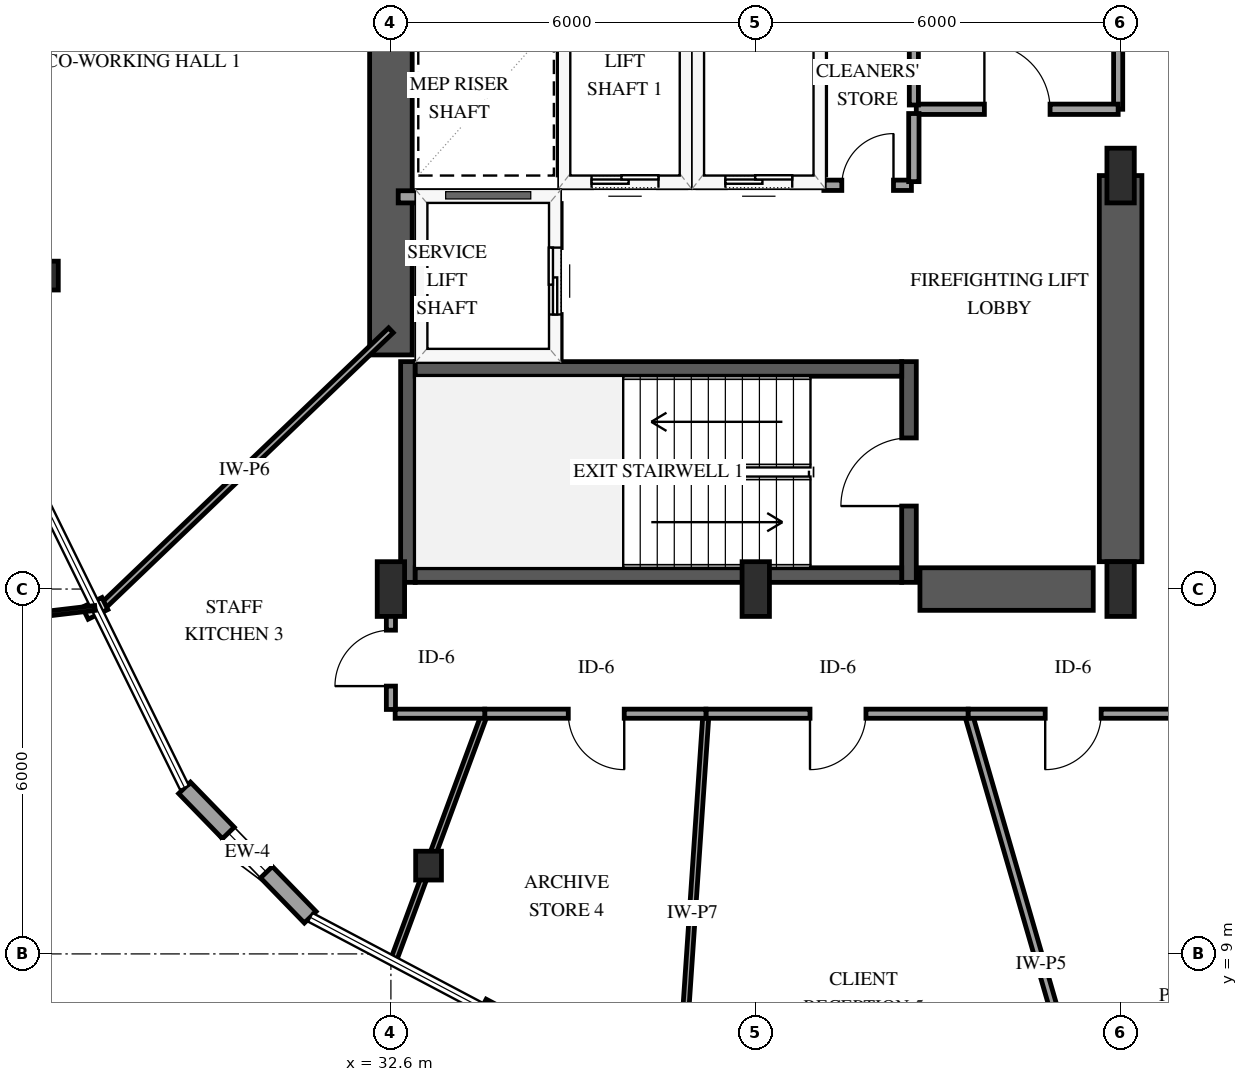
"""IFC4 building model, lengths in metres.
Left out: names, types, materials, properties, quantities, classifications, styles, units other than length and angle.
Written with IfcOpenShell. Run it as: python <this file> out.ifc"""

import sys

from ifc_helpers import new_model, si_unit, direction, frame, frame_2d, origin, origin_2d, place, context, subcontext, project, spatial, rectangle, i_section, extrude, element, fill, save


model = new_model("IFC4")
c1 = context("Model", 3, precision=1e-05, world=origin(), true_north=direction((0.0, 1.0)))
c2 = subcontext(c1, "Body", "Model", "MODEL_VIEW")
j1 = project(units=[si_unit("LENGTHUNIT", "METRE"), si_unit("PLANEANGLEUNIT", "RADIAN")], contexts=[c1])
p1 = place(None, origin())
s1 = spatial("IfcSite", under=j1, at=p1, CompositionType="ELEMENT")
p2 = place(p1, origin())
s2 = spatial("IfcBuilding", under=s1, at=p2, CompositionType="ELEMENT")
p3 = place(p2, frame((0.0, 0.0, 58.6)))
s3 = spatial("IfcBuildingStorey", under=s2, at=p3, CompositionType="ELEMENT", Elevation=58.6)
p4 = place(p3, frame((32.88, 15.11, 0.0), z_axis=(0.0, 0.0, 1.0), x_axis=(0.0, 1.0, 0.0)))
e1 = element("IfcWall", 1, at=p4, inside=s3, PredefinedType="SHEAR", context=c2, shape_type="SweptSolid", body=[
    extrude(rectangle(XDim=3.63, YDim=0.24, at=frame_2d((1.815, 0.0))), origin(), (0.0, 0.0, 1.0), 4.0),
])
p5 = place(p3, frame((41.12, 15.11, 0.0), z_axis=(0.0, 0.0, 1.0), x_axis=(0.0, 1.0, 0.0)))
e2 = element("IfcWall", 2, at=p5, inside=s3, PredefinedType="SHEAR", context=c2, shape_type="SweptSolid", body=[
    extrude(rectangle(XDim=3.63, YDim=0.24, at=frame_2d((1.815, 0.0))), origin(), (0.0, 0.0, 1.0), 4.0),
])
p6 = place(p5, frame((1.255, 0.0, 0.0)))
e3 = element("IfcOpeningElement", 3, at=p6, cuts=e2, PredefinedType="OPENING", context=c2, shape_type="SweptSolid", body=[
    extrude(rectangle(XDim=1.12, YDim=2.15, at=frame_2d((0.56, 1.075))), frame((0.0, 0.13, 0.0), z_axis=(0.0, -1.0, 0.0), x_axis=(1.0, 0.0, 0.0)), (0.0, 0.0, 1.0), 0.26),
])
for number, where, z_axis, x_axis in (
    (4, (33.0, 15.23, 0.0), (0.0, 0.0, 1.0), (1.0, 0.0, 0.0)),
    (5, (33.0, 18.62, 0.0), (0.0, 0.0, 1.0), (1.0, 0.0, 0.0)),
):
    element("IfcWall", number, at=place(p3, frame(where, z_axis=z_axis, x_axis=x_axis)), inside=s3, PredefinedType="SHEAR", context=c2, shape_type="SweptSolid", body=[
        extrude(rectangle(XDim=8.0, YDim=0.24, at=frame_2d((4.0, 0.0))), origin(), (0.0, 0.0, 1.0), 4.0),
    ])
p7 = place(p3, frame((32.6, 18.85, 0.0), z_axis=(0.0, 0.0, 1.0), x_axis=(0.0, 1.0, 0.0)))
e6 = element("IfcWall", 6, at=p7, inside=s3, PredefinedType="SHEAR", context=c2, shape_type="SweptSolid", body=[
    extrude(rectangle(XDim=12.3, YDim=0.7, at=frame_2d((6.15, 0.0))), origin(), (0.0, 0.0, 1.0), 4.0),
])
p8 = place(p3, frame((41.3, 15.0, 0.0), z_axis=(0.0, 0.0, 1.0), x_axis=(1.0, 0.0, 0.0)))
e7 = element("IfcWall", 7, at=p8, inside=s3, PredefinedType="SHEAR", context=c2, shape_type="SweptSolid", body=[
    extrude(rectangle(XDim=2.85, YDim=0.7, at=frame_2d((1.425, 0.0))), origin(), (0.0, 0.0, 1.0), 4.0),
])
p9 = place(p3, frame((44.6, 15.45, 0.0), z_axis=(0.0, 0.0, 1.0), x_axis=(0.0, 1.0, 0.0)))
e8 = element("IfcWall", 8, at=p9, inside=s3, PredefinedType="SHEAR", context=c2, shape_type="SweptSolid", body=[
    extrude(rectangle(XDim=6.35, YDim=0.7, at=frame_2d((3.175, 0.0))), origin(), (0.0, 0.0, 1.0), 4.0),
])
for number, where, z_axis, x_axis in (
    (9, (32.6, 15.0, 0.0), (0.0, 0.0, 1.0), (1.0, 0.0, 0.0)),
    (10, (38.6, 15.0, 0.0), (0.0, 0.0, 1.0), (1.0, 0.0, 0.0)),
    (11, (44.6, 15.0, 0.0), (0.0, 0.0, 1.0), (1.0, 0.0, 0.0)),
    (12, (44.6, 21.8, 0.0), (0.0, 0.0, 1.0), (1.0, 0.0, 0.0)),
):
    element("IfcColumn", number, at=place(p3, frame(where, z_axis=z_axis, x_axis=x_axis)), inside=s3, PredefinedType="PILASTER", context=c2, shape_type="SweptSolid", body=[
        extrude(rectangle(XDim=0.45, YDim=0.9, at=origin_2d()), origin(), (0.0, 0.0, 1.0), 4.0),
    ])
for number, where, z_axis, x_axis in (
    (13, (26.918, 20.155, 0.0), (0.0, 0.0, 1.0), (1.0, 0.0, 0.0)),
    (14, (33.219, 10.452, 0.0), (0.0, 0.0, 1.0), (1.0, 0.0, 0.0)),
):
    element("IfcColumn", number, at=place(p3, frame(where, z_axis=z_axis, x_axis=x_axis)), inside=s3, PredefinedType="COLUMN", context=c2, shape_type="SweptSolid", body=[
        extrude(i_section(OverallWidth=0.424, OverallDepth=0.474, WebThickness=0.048, FlangeThickness=0.077, FilletRadius=0.038, at=origin_2d()), origin(), (0.0, 0.0, 1.0), 4.0),
    ])
p10 = place(p3, frame((29.207, 11.731, 0.0), z_axis=(0.0, 0.0, 1.0), x_axis=(0.69666106732, -0.717400416282, 0.0)))
e15 = element("IfcWall", 15, at=p10, inside=s3, PredefinedType="SOLIDWALL", context=c2, shape_type="SweptSolid", body=[
    extrude(rectangle(XDim=2.967, YDim=0.27, at=frame_2d((1.483, 0.0))), origin(), (0.0, 0.0, 1.0), 3.079),
])
p11 = place(p10, frame((1.033, 0.0, 0.75)))
e16 = element("IfcOpeningElement", 16, at=p11, cuts=e15, PredefinedType="OPENING", context=c2, shape_type="SweptSolid", body=[
    extrude(rectangle(XDim=0.9, YDim=1.5, at=frame_2d((0.45, 0.75))), frame((0.0, 0.145, 0.0), z_axis=(0.0, -1.0, 0.0), x_axis=(1.0, 0.0, 0.0)), (0.0, 0.0, 1.0), 0.29),
])
p12 = place(p3, frame((35.45, 21.7, 0.0), z_axis=(0.0, 0.0, 1.0), x_axis=(1.0, 0.0, 0.0)))
e17 = element("IfcWall", 17, at=p12, inside=s3, PredefinedType="SOLIDWALL", context=c2, shape_type="SweptSolid", body=[
    extrude(rectangle(XDim=2.0, YDim=0.2, at=frame_2d((1.0, 0.0))), origin(), (0.0, 0.0, 1.0), 3.7),
])
p13 = place(p12, frame((0.45, 0.0, 0.0)))
e18 = element("IfcOpeningElement", 18, at=p13, cuts=e17, PredefinedType="OPENING", context=c2, shape_type="SweptSolid", body=[
    extrude(rectangle(XDim=1.1, YDim=2.15, at=frame_2d((0.55, 1.075))), frame((0.0, 0.11, 0.0), z_axis=(0.0, -1.0, 0.0), x_axis=(1.0, 0.0, 0.0)), (0.0, 0.0, 1.0), 0.22),
])
for number, where, z_axis, x_axis in (
    (19, (35.45, 21.81, 0.0), (0.0, 0.0, 1.0), (0.0, 1.0, 0.0)),
    (20, (37.45, 21.81, 0.0), (0.0, 0.0, 1.0), (0.0, 1.0, 0.0)),
):
    element("IfcWall", number, at=place(p3, frame(where, z_axis=z_axis, x_axis=x_axis)), inside=s3, PredefinedType="SOLIDWALL", context=c2, shape_type="SweptSolid", body=[
        extrude(rectangle(XDim=2.38, YDim=0.2, at=frame_2d((1.19, 0.0))), origin(), (0.0, 0.0, 1.0), 3.7),
    ])
p14 = place(p3, frame((37.65, 21.7, 0.0), z_axis=(0.0, 0.0, 1.0), x_axis=(1.0, 0.0, 0.0)))
e21 = element("IfcWall", 21, at=p14, inside=s3, PredefinedType="SOLIDWALL", context=c2, shape_type="SweptSolid", body=[
    extrude(rectangle(XDim=2.0, YDim=0.2, at=frame_2d((1.0, 0.0))), origin(), (0.0, 0.0, 1.0), 3.7),
])
p15 = place(p14, frame((0.45, 0.0, 0.0)))
e22 = element("IfcOpeningElement", 22, at=p15, cuts=e21, PredefinedType="OPENING", context=c2, shape_type="SweptSolid", body=[
    extrude(rectangle(XDim=1.1, YDim=2.15, at=frame_2d((0.55, 1.075))), frame((0.0, 0.11, 0.0), z_axis=(0.0, -1.0, 0.0), x_axis=(1.0, 0.0, 0.0)), (0.0, 0.0, 1.0), 0.22),
])
p16 = place(p3, frame((39.65, 21.81, 0.0), z_axis=(0.0, 0.0, 1.0), x_axis=(0.0, 1.0, 0.0)))
e23 = element("IfcWall", 23, at=p16, inside=s3, PredefinedType="SOLIDWALL", context=c2, shape_type="SweptSolid", body=[
    extrude(rectangle(XDim=2.38, YDim=0.2, at=frame_2d((1.19, 0.0))), origin(), (0.0, 0.0, 1.0), 3.7),
])
p17 = place(p3, frame((32.72, 21.45, 0.0), z_axis=(0.0, 0.0, 1.0), x_axis=(1.0, 0.0, 0.0)))
e24 = element("IfcWall", 24, at=p17, inside=s3, PredefinedType="SOLIDWALL", context=c2, shape_type="SweptSolid", body=[
    extrude(rectangle(XDim=2.58, YDim=0.2, at=frame_2d((1.29, 0.0))), origin(), (0.0, 0.0, 1.0), 3.7),
])
p18 = place(p3, frame((35.3, 18.79, 0.0), z_axis=(0.0, 0.0, 1.0), x_axis=(0.0, 1.0, 0.0)))
e25 = element("IfcWall", 25, at=p18, inside=s3, PredefinedType="SOLIDWALL", context=c2, shape_type="SweptSolid", body=[
    extrude(rectangle(XDim=2.55, YDim=0.2, at=frame_2d((1.275, 0.0))), origin(), (0.0, 0.0, 1.0), 3.7),
])
p19 = place(p18, frame((0.725, 0.0, 0.0)))
e26 = element("IfcOpeningElement", 26, at=p19, cuts=e25, PredefinedType="OPENING", context=c2, shape_type="SweptSolid", body=[
    extrude(rectangle(XDim=1.1, YDim=2.15, at=frame_2d((0.55, 1.075))), frame((0.0, 0.11, 0.0), z_axis=(0.0, -1.0, 0.0), x_axis=(1.0, 0.0, 0.0)), (0.0, 0.0, 1.0), 0.22),
])
p20 = place(p3, frame((42.094, 12.95, 0.0), z_axis=(0.0, 0.0, 1.0), x_axis=(0.278463654044, -0.960446767591, 0.0)))
e27 = element("IfcWall", 27, at=p20, inside=s3, PredefinedType="PARTITIONING", context=c2, shape_type="SweptSolid", body=[
    extrude(rectangle(XDim=8.594, YDim=0.13, at=frame_2d((4.297, 0.0))), origin(), (0.0, 0.0, 1.0), 2.995),
])
p21 = place(p3, frame((44.56, 29.8, 0.0), z_axis=(0.0, 0.0, 1.0), x_axis=(0.0, -1.0, 0.0)))
e28 = element("IfcWall", 28, at=p21, inside=s3, PredefinedType="PARTITIONING", context=c2, shape_type="SweptSolid", body=[
    extrude(rectangle(XDim=6.91, YDim=0.15, at=frame_2d((3.455, 0.0))), origin(), (0.0, 0.0, 1.0), 2.74),
])
p22 = place(p21, frame((2.915, 0.0, 0.0)))
e29 = element("IfcOpeningElement", 29, at=p22, cuts=e28, PredefinedType="OPENING", context=c2, shape_type="SweptSolid", body=[
    extrude(rectangle(XDim=1.08, YDim=2.15, at=frame_2d((0.54, 1.075))), frame((0.0, 0.085, 0.0), z_axis=(0.0, -1.0, 0.0), x_axis=(1.0, 0.0, 0.0)), (0.0, 0.0, 1.0), 0.17),
])
p23 = place(p3, frame((32.6, 19.255, 0.0), z_axis=(0.0, 0.0, 1.0), x_axis=(-0.722302567559, -0.691577183615, 0.0)))
e30 = element("IfcWall", 30, at=p23, inside=s3, PredefinedType="PARTITIONING", context=c2, shape_type="SweptSolid", body=[
    extrude(rectangle(XDim=6.675, YDim=0.11, at=frame_2d((3.337, 0.0))), origin(), (0.0, 0.0, 1.0), 3.7),
])
p24 = place(p3, frame((37.781, 12.95, 0.0), z_axis=(0.0, 0.0, 1.0), x_axis=(-0.067802603225, -0.997698755635, 0.0)))
e31 = element("IfcWall", 31, at=p24, inside=s3, PredefinedType="PARTITIONING", context=c2, shape_type="SweptSolid", body=[
    extrude(rectangle(XDim=6.564, YDim=0.1, at=frame_2d((3.282, 0.0))), origin(), (0.0, 0.0, 1.0), 3.7),
])
p25 = place(p3, frame((34.143, 12.95, 0.0), z_axis=(0.0, 0.0, 1.0), x_axis=(-0.347011852363, -0.937860743565, 0.0)))
e32 = element("IfcWall", 32, at=p25, inside=s3, PredefinedType="PARTITIONING", context=c2, shape_type="SweptSolid", body=[
    extrude(rectangle(XDim=4.337, YDim=0.1, at=frame_2d((2.169, 0.0))), origin(), (0.0, 0.0, 1.0), 2.995),
])
p26 = place(p3, frame((42.094, 12.95, 0.0), z_axis=(0.0, 0.0, 1.0), x_axis=(-1.0, 0.0, 0.0)))
e33 = element("IfcWall", 33, at=p26, inside=s3, PredefinedType="PARTITIONING", context=c2, shape_type="SweptSolid", body=[
    extrude(rectangle(XDim=4.313, YDim=0.15, at=frame_2d((2.156, 0.0))), origin(), (0.0, 0.0, 1.0), 3.7),
])
p27 = place(p26, frame((1.682, 0.0, 0.0)))
e34 = element("IfcOpeningElement", 34, at=p27, cuts=e33, PredefinedType="OPENING", context=c2, shape_type="SweptSolid", body=[
    extrude(rectangle(XDim=0.92, YDim=2.12, at=frame_2d((0.46, 1.06))), frame((0.0, 0.085, 0.0), z_axis=(0.0, -1.0, 0.0), x_axis=(1.0, 0.0, 0.0)), (0.0, 0.0, 1.0), 0.17),
])
p28 = place(p3, frame((37.781, 12.95, 0.0), z_axis=(0.0, 0.0, 1.0), x_axis=(-1.0, 0.0, 0.0)))
e35 = element("IfcWall", 35, at=p28, inside=s3, PredefinedType="PARTITIONING", context=c2, shape_type="SweptSolid", body=[
    extrude(rectangle(XDim=3.638, YDim=0.15, at=frame_2d((1.819, 0.0))), origin(), (0.0, 0.0, 1.0), 3.7),
])
p29 = place(p28, frame((1.344, 0.0, 0.0)))
e36 = element("IfcOpeningElement", 36, at=p29, cuts=e35, PredefinedType="OPENING", context=c2, shape_type="SweptSolid", body=[
    extrude(rectangle(XDim=0.92, YDim=2.12, at=frame_2d((0.46, 1.06))), frame((0.0, 0.085, 0.0), z_axis=(0.0, -1.0, 0.0), x_axis=(1.0, 0.0, 0.0)), (0.0, 0.0, 1.0), 0.17),
])
p30 = place(p3, frame((45.517, 12.95, 0.0), z_axis=(0.0, 0.0, 1.0), x_axis=(-1.0, 0.0, 0.0)))
e37 = element("IfcWall", 37, at=p30, inside=s3, PredefinedType="PARTITIONING", context=c2, shape_type="SweptSolid", body=[
    extrude(rectangle(XDim=3.423, YDim=0.15, at=frame_2d((1.711, 0.0))), origin(), (0.0, 0.0, 1.0), 3.7),
])
p31 = place(p30, frame((1.237, 0.0, 0.0)))
e38 = element("IfcOpeningElement", 38, at=p31, cuts=e37, PredefinedType="OPENING", context=c2, shape_type="SweptSolid", body=[
    extrude(rectangle(XDim=0.92, YDim=2.12, at=frame_2d((0.46, 1.06))), frame((0.0, 0.085, 0.0), z_axis=(0.0, -1.0, 0.0), x_axis=(1.0, 0.0, 0.0)), (0.0, 0.0, 1.0), 0.17),
])
p32 = place(p3, frame((41.24, 22.89, 0.0), z_axis=(0.0, 0.0, 1.0), x_axis=(1.0, 0.0, 0.0)))
e39 = element("IfcWall", 39, at=p32, inside=s3, PredefinedType="PARTITIONING", context=c2, shape_type="SweptSolid", body=[
    extrude(rectangle(XDim=3.32, YDim=0.17, at=frame_2d((1.66, 0.0))), origin(), (0.0, 0.0, 1.0), 3.7),
])
p33 = place(p32, frame((1.12, 0.0, 0.0)))
e40 = element("IfcOpeningElement", 40, at=p33, cuts=e39, PredefinedType="OPENING", context=c2, shape_type="SweptSolid", body=[
    extrude(rectangle(XDim=1.08, YDim=2.15, at=frame_2d((0.54, 1.075))), frame((0.0, 0.095, 0.0), z_axis=(0.0, -1.0, 0.0), x_axis=(1.0, 0.0, 0.0)), (0.0, 0.0, 1.0), 0.19),
])
p34 = place(p3, frame((32.6, 13.02, 0.0), z_axis=(0.0, 0.0, 1.0), x_axis=(0.0, 1.0, 0.0)))
e41 = element("IfcWall", 41, at=p34, inside=s3, PredefinedType="PARTITIONING", context=c2, shape_type="SweptSolid", body=[
    extrude(rectangle(XDim=1.91, YDim=0.15, at=frame_2d((0.955, 0.0))), origin(), (0.0, 0.0, 1.0), 3.7),
])
p35 = place(p34, frame((0.384, 0.0, 0.0)))
e42 = element("IfcOpeningElement", 42, at=p35, cuts=e41, PredefinedType="OPENING", context=c2, shape_type="SweptSolid", body=[
    extrude(rectangle(XDim=0.92, YDim=2.12, at=frame_2d((0.46, 1.06))), frame((0.0, 0.085, 0.0), z_axis=(0.0, -1.0, 0.0), x_axis=(1.0, 0.0, 0.0)), (0.0, 0.0, 1.0), 0.17),
])
p36 = place(p3, frame((41.2, 22.96, 0.0), z_axis=(0.0, 0.0, 1.0), x_axis=(0.0, 1.0, 0.0)))
e43 = element("IfcWall", 43, at=p36, inside=s3, PredefinedType="PARTITIONING", context=c2, shape_type="SweptSolid", body=[
    extrude(rectangle(XDim=1.69, YDim=0.15, at=frame_2d((0.845, 0.0))), origin(), (0.0, 0.0, 1.0), 3.7),
])
p37 = place(p3, frame((34.143, 12.95, 0.0), z_axis=(0.0, 0.0, 1.0), x_axis=(-1.0, 0.0, 0.0)))
e44 = element("IfcWall", 44, at=p37, inside=s3, PredefinedType="PARTITIONING", context=c2, shape_type="SweptSolid", body=[
    extrude(rectangle(XDim=1.473, YDim=0.15, at=frame_2d((0.737, 0.0))), origin(), (0.0, 0.0, 1.0), 3.7),
])
p38 = place(p3, frame((39.72, 21.64, 0.0), z_axis=(0.0, 0.0, 1.0), x_axis=(1.0, 0.0, 0.0)))
e45 = element("IfcWall", 45, at=p38, inside=s3, PredefinedType="PARTITIONING", context=c2, shape_type="SweptSolid", body=[
    extrude(rectangle(XDim=1.44, YDim=0.17, at=frame_2d((0.72, 0.0))), origin(), (0.0, 0.0, 1.0), 3.7),
])
p39 = place(p38, frame((0.295, 0.0, 0.0)))
e46 = element("IfcOpeningElement", 46, at=p39, cuts=e45, PredefinedType="OPENING", context=c2, shape_type="SweptSolid", body=[
    extrude(rectangle(XDim=0.85, YDim=2.1, at=frame_2d((0.425, 1.05))), frame((0.0, 0.095, 0.0), z_axis=(0.0, -1.0, 0.0), x_axis=(1.0, 0.0, 0.0)), (0.0, 0.0, 1.0), 0.19),
])
p40 = place(p3, frame((41.2, 21.7, 0.0), z_axis=(0.0, 0.0, 1.0), x_axis=(0.0, 1.0, 0.0)))
e47 = element("IfcWall", 47, at=p40, inside=s3, PredefinedType="PARTITIONING", context=c2, shape_type="SweptSolid", body=[
    extrude(rectangle(XDim=1.12, YDim=0.17, at=frame_2d((0.56, 0.0))), origin(), (0.0, 0.0, 1.0), 3.7),
])
p41 = place(p11, origin())
e48 = element("IfcWindow", 48, at=p41, inside=s3, PartitioningType="SINGLE_PANEL", PredefinedType="WINDOW", context=c2, shape_type="SweptSolid", body=[
    extrude(rectangle(XDim=0.9, YDim=1.5, at=frame_2d((0.45, 0.75))), frame((0.0, 0.03, 0.0), z_axis=(0.0, -1.0, 0.0), x_axis=(1.0, 0.0, 0.0)), (0.0, 0.0, 1.0), 0.06),
])
fill(e16, e48)
p42 = place(p13, origin())
e49 = element("IfcDoor", 49, at=p42, inside=s3, OperationType="SLIDING_TO_LEFT", PredefinedType="DOOR", context=c2, shape_type="SweptSolid", body=[
    extrude(rectangle(XDim=1.1, YDim=2.15, at=frame_2d((0.55, 1.075))), frame((0.0, 0.025, 0.0), z_axis=(0.0, -1.0, 0.0), x_axis=(1.0, 0.0, 0.0)), (0.0, 0.0, 1.0), 0.05),
])
fill(e18, e49)
p43 = place(p15, origin())
e50 = element("IfcDoor", 50, at=p43, inside=s3, OperationType="SLIDING_TO_LEFT", PredefinedType="DOOR", context=c2, shape_type="SweptSolid", body=[
    extrude(rectangle(XDim=1.1, YDim=2.15, at=frame_2d((0.55, 1.075))), frame((0.0, 0.025, 0.0), z_axis=(0.0, -1.0, 0.0), x_axis=(1.0, 0.0, 0.0)), (0.0, 0.0, 1.0), 0.05),
])
fill(e22, e50)
p44 = place(p19, origin())
e51 = element("IfcDoor", 51, at=p44, inside=s3, OperationType="SLIDING_TO_LEFT", PredefinedType="DOOR", context=c2, shape_type="SweptSolid", body=[
    extrude(rectangle(XDim=1.1, YDim=2.15, at=frame_2d((0.55, 1.075))), frame((0.0, 0.025, 0.0), z_axis=(0.0, -1.0, 0.0), x_axis=(1.0, 0.0, 0.0)), (0.0, 0.0, 1.0), 0.05),
])
fill(e26, e51)
p45 = place(p6, origin())
e52 = element("IfcDoor", 52, at=p45, inside=s3, OperationType="SINGLE_SWING_LEFT", PredefinedType="DOOR", context=c2, shape_type="SweptSolid", body=[
    extrude(rectangle(XDim=1.12, YDim=2.15, at=frame_2d((0.56, 1.075))), frame((0.0, 0.025, 0.0), z_axis=(0.0, -1.0, 0.0), x_axis=(1.0, 0.0, 0.0)), (0.0, 0.0, 1.0), 0.05),
])
fill(e3, e52)
p46 = place(p27, origin())
e53 = element("IfcDoor", 53, at=p46, inside=s3, OperationType="SINGLE_SWING_RIGHT", PredefinedType="DOOR", context=c2, shape_type="SweptSolid", body=[
    extrude(rectangle(XDim=0.92, YDim=2.12, at=frame_2d((0.46, 1.06))), frame((0.0, 0.025, 0.0), z_axis=(0.0, -1.0, 0.0), x_axis=(1.0, 0.0, 0.0)), (0.0, 0.0, 1.0), 0.05),
])
fill(e34, e53)
p47 = place(p29, origin())
e54 = element("IfcDoor", 54, at=p47, inside=s3, OperationType="SINGLE_SWING_LEFT", PredefinedType="DOOR", context=c2, shape_type="SweptSolid", body=[
    extrude(rectangle(XDim=0.92, YDim=2.12, at=frame_2d((0.46, 1.06))), frame((0.0, 0.025, 0.0), z_axis=(0.0, -1.0, 0.0), x_axis=(1.0, 0.0, 0.0)), (0.0, 0.0, 1.0), 0.05),
])
fill(e36, e54)
p48 = place(p31, origin())
e55 = element("IfcDoor", 55, at=p48, inside=s3, OperationType="SINGLE_SWING_RIGHT", PredefinedType="DOOR", context=c2, shape_type="SweptSolid", body=[
    extrude(rectangle(XDim=0.92, YDim=2.12, at=frame_2d((0.46, 1.06))), frame((0.0, 0.025, 0.0), z_axis=(0.0, -1.0, 0.0), x_axis=(1.0, 0.0, 0.0)), (0.0, 0.0, 1.0), 0.05),
])
fill(e38, e55)
p49 = place(p33, origin())
e56 = element("IfcDoor", 56, at=p49, inside=s3, OperationType="SINGLE_SWING_LEFT", PredefinedType="DOOR", context=c2, shape_type="SweptSolid", body=[
    extrude(rectangle(XDim=1.08, YDim=2.15, at=frame_2d((0.54, 1.075))), frame((0.0, 0.025, 0.0), z_axis=(0.0, -1.0, 0.0), x_axis=(1.0, 0.0, 0.0)), (0.0, 0.0, 1.0), 0.05),
])
fill(e40, e56)
p50 = place(p35, origin())
e57 = element("IfcDoor", 57, at=p50, inside=s3, OperationType="SINGLE_SWING_LEFT", PredefinedType="DOOR", context=c2, shape_type="SweptSolid", body=[
    extrude(rectangle(XDim=0.92, YDim=2.12, at=frame_2d((0.46, 1.06))), frame((0.0, 0.025, 0.0), z_axis=(0.0, -1.0, 0.0), x_axis=(1.0, 0.0, 0.0)), (0.0, 0.0, 1.0), 0.05),
])
fill(e42, e57)
p51 = place(p39, origin())
e58 = element("IfcDoor", 58, at=p51, inside=s3, OperationType="SINGLE_SWING_RIGHT", PredefinedType="DOOR", context=c2, shape_type="SweptSolid", body=[
    extrude(rectangle(XDim=0.85, YDim=2.1, at=frame_2d((0.425, 1.05))), frame((0.0, 0.025, 0.0), z_axis=(0.0, -1.0, 0.0), x_axis=(1.0, 0.0, 0.0)), (0.0, 0.0, 1.0), 0.05),
])
fill(e46, e58)
save(model, sys.argv[1])
